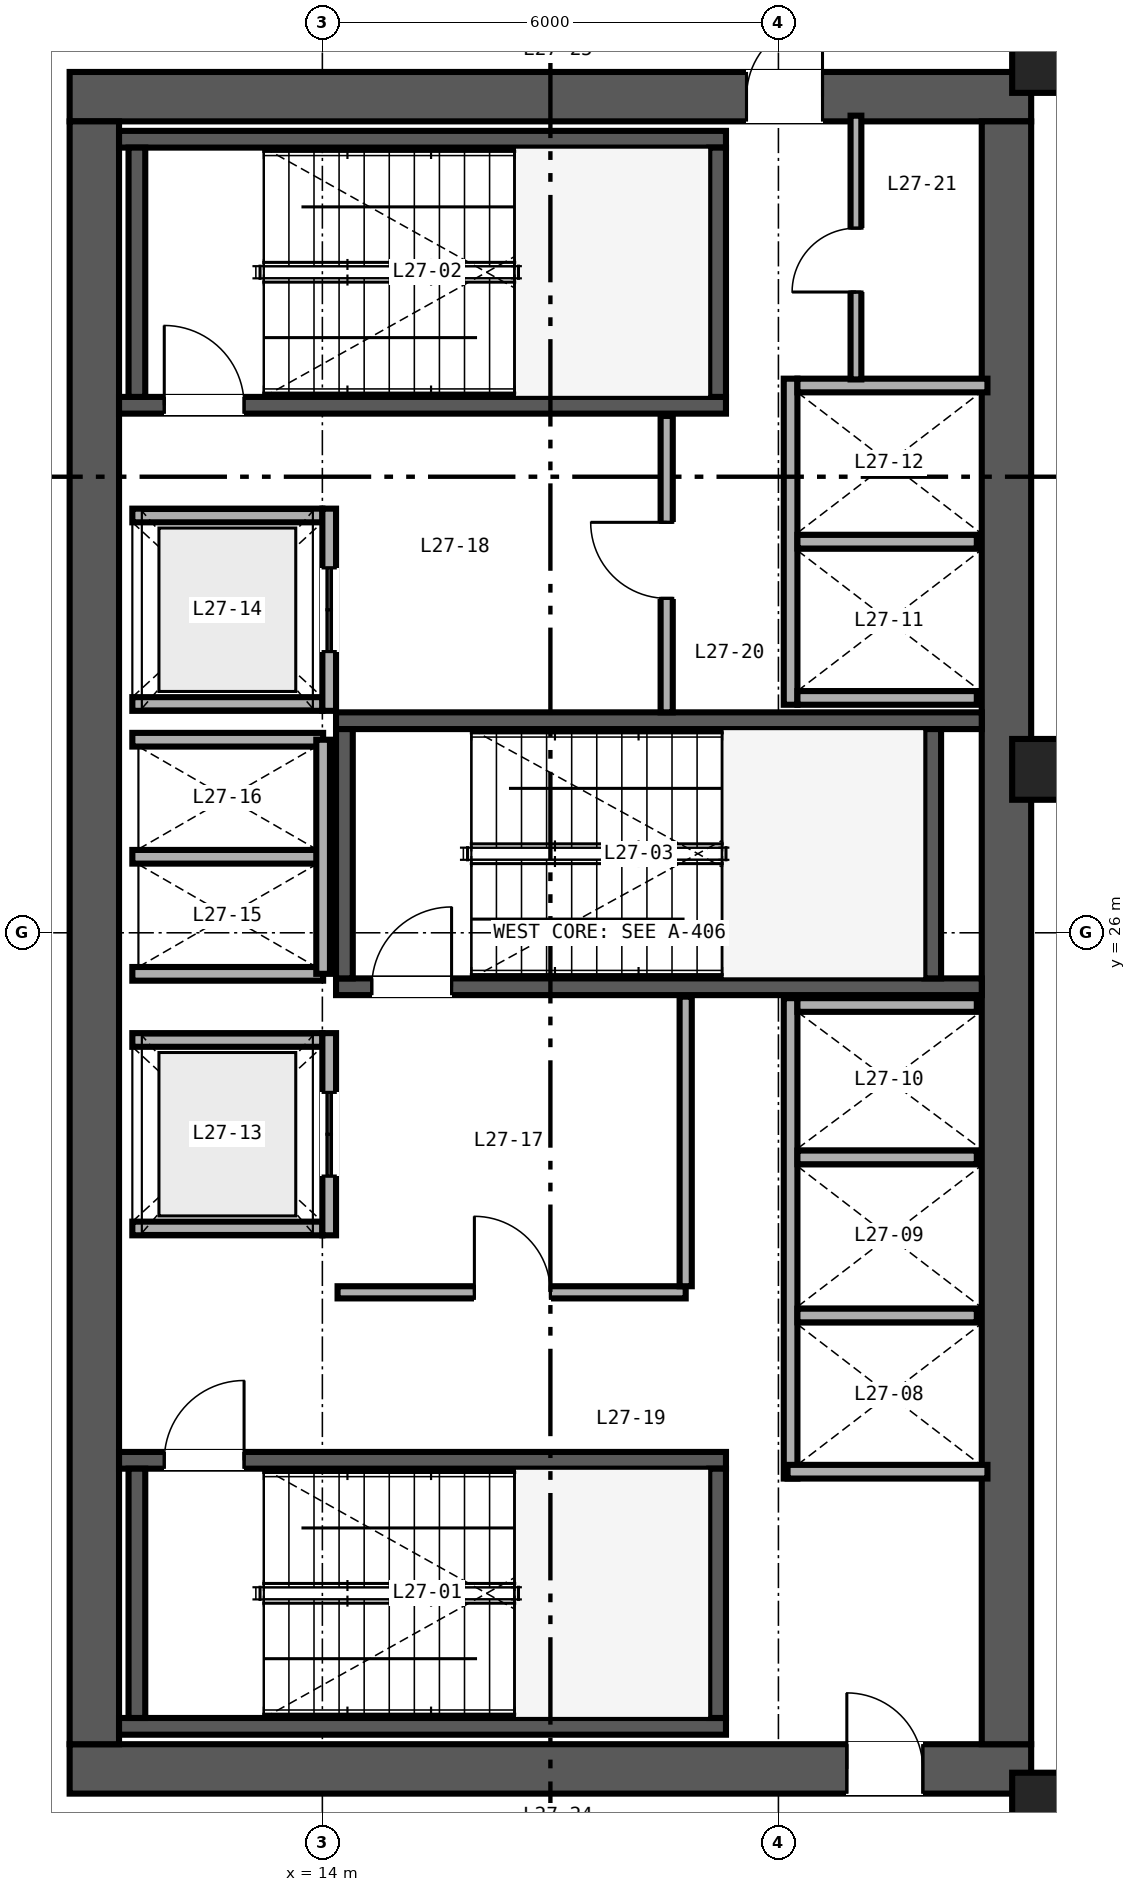
"""IFC4 building model, lengths in metres.
Left out: names, types, materials, properties, quantities, classifications, styles, units other than length and angle.
Written with IfcOpenShell. Run it as: python <this file> out.ifc"""

import sys

from ifc_helpers import new_model, si_unit, direction, frame, frame_2d, origin, origin_2d, place, context, subcontext, project, spatial, rectangle, hollow_rectangle, extrude, source, transform, mapped, element, fill, save


model = new_model("IFC4")
c1 = context("Model", 3, precision=1e-05, world=origin(), true_north=direction((0.0, 1.0)))
c2 = subcontext(c1, "Body", "Model", "MODEL_VIEW")
j1 = project(units=[si_unit("LENGTHUNIT", "METRE"), si_unit("PLANEANGLEUNIT", "RADIAN")], contexts=[c1])
p1 = place(None, origin())
s1 = spatial("IfcSite", under=j1, at=p1, CompositionType="ELEMENT")
p2 = place(p1, origin())
s2 = spatial("IfcBuilding", under=s1, at=p2, CompositionType="ELEMENT")
p3 = place(p2, frame((0.0, 0.0, 111.6)))
s3 = spatial("IfcBuildingStorey", under=s2, at=p3, CompositionType="ELEMENT", Elevation=111.6)
p4 = place(p3, frame((10.675, 15.0, 0.0), z_axis=(0.0, 0.0, 1.0), x_axis=(1.0, 0.0, 0.0)))
e1 = element("IfcWall", 1, at=p4, inside=s3, PredefinedType="SHEAR", context=c2, shape_type="SweptSolid", body=[
    extrude(rectangle(XDim=12.65, YDim=0.65, at=frame_2d((6.325, 0.0))), origin(), (0.0, 0.0, 1.0), 3.36),
])
p5 = place(p4, frame((10.225, 0.0, 0.0)))
e2 = element("IfcOpeningElement", 2, at=p5, cuts=e1, PredefinedType="OPENING", context=c2, shape_type="SweptSolid", body=[
    extrude(rectangle(XDim=1.0, YDim=2.15, at=frame_2d((0.5, 1.075))), frame((0.0, 0.335, 0.0), z_axis=(0.0, -1.0, 0.0), x_axis=(1.0, 0.0, 0.0)), (0.0, 0.0, 1.0), 0.67),
])
p6 = place(p3, frame((10.675, 37.0, 0.0), z_axis=(0.0, 0.0, 1.0), x_axis=(1.0, 0.0, 0.0)))
e3 = element("IfcWall", 3, at=p6, inside=s3, PredefinedType="SHEAR", context=c2, shape_type="SweptSolid", body=[
    extrude(rectangle(XDim=12.65, YDim=0.65, at=frame_2d((6.325, 0.0))), origin(), (0.0, 0.0, 1.0), 3.36),
])
p7 = place(p6, frame((8.905, 0.0, 0.0)))
e4 = element("IfcOpeningElement", 4, at=p7, cuts=e3, PredefinedType="OPENING", context=c2, shape_type="SweptSolid", body=[
    extrude(rectangle(XDim=1.0, YDim=2.15, at=frame_2d((0.5, 1.075))), frame((0.0, 0.335, 0.0), z_axis=(0.0, -1.0, 0.0), x_axis=(1.0, 0.0, 0.0)), (0.0, 0.0, 1.0), 0.67),
])
for number, where, z_axis, x_axis in (
    (5, (11.0, 15.325, 0.0), (0.0, 0.0, 1.0), (0.0, 1.0, 0.0)),
    (6, (23.0, 15.325, 0.0), (0.0, 0.0, 1.0), (0.0, 1.0, 0.0)),
):
    element("IfcWall", number, at=place(p3, frame(where, z_axis=z_axis, x_axis=x_axis)), inside=s3, PredefinedType="SHEAR", context=c2, shape_type="SweptSolid", body=[
        extrude(rectangle(XDim=21.35, YDim=0.65, at=frame_2d((10.675, 0.0))), origin(), (0.0, 0.0, 1.0), 3.36),
    ])
p8 = place(p3, frame((11.325, 15.56, 0.0), z_axis=(0.0, 0.0, 1.0), x_axis=(1.0, 0.0, 0.0)))
e7 = element("IfcWall", 7, at=p8, inside=s3, PredefinedType="SHEAR", context=c2, shape_type="SweptSolid", body=[
    extrude(rectangle(XDim=7.985, YDim=0.22, at=frame_2d((3.993, 0.0))), origin(), (0.0, 0.0, 1.0), 3.4),
])
p9 = place(p3, frame((11.325, 19.06, 0.0), z_axis=(0.0, 0.0, 1.0), x_axis=(1.0, 0.0, 0.0)))
e8 = element("IfcWall", 8, at=p9, inside=s3, PredefinedType="SHEAR", context=c2, shape_type="SweptSolid", body=[
    extrude(rectangle(XDim=7.985, YDim=0.22, at=frame_2d((3.993, 0.0))), origin(), (0.0, 0.0, 1.0), 3.4),
])
p10 = place(p9, frame((0.595, 0.0, 0.0)))
e9 = element("IfcOpeningElement", 9, at=p10, cuts=e8, PredefinedType="OPENING", context=c2, shape_type="SweptSolid", body=[
    extrude(rectangle(XDim=1.05, YDim=2.15, at=frame_2d((0.525, 1.075))), frame((0.0, 0.12, 0.0), z_axis=(0.0, -1.0, 0.0), x_axis=(1.0, 0.0, 0.0)), (0.0, 0.0, 1.0), 0.24),
])
for number, where, z_axis, x_axis in (
    (10, (11.56, 15.67, 0.0), (0.0, 0.0, 1.0), (0.0, 1.0, 0.0)),
    (11, (19.2, 15.67, 0.0), (0.0, 0.0, 1.0), (0.0, 1.0, 0.0)),
):
    element("IfcWall", number, at=place(p3, frame(where, z_axis=z_axis, x_axis=x_axis)), inside=s3, PredefinedType="SHEAR", context=c2, shape_type="SweptSolid", body=[
        extrude(rectangle(XDim=3.28, YDim=0.22, at=frame_2d((1.64, 0.0))), origin(), (0.0, 0.0, 1.0), 3.4),
    ])
p11 = place(p3, frame((11.325, 32.94, 0.0), z_axis=(0.0, 0.0, 1.0), x_axis=(1.0, 0.0, 0.0)))
e12 = element("IfcWall", 12, at=p11, inside=s3, PredefinedType="SHEAR", context=c2, shape_type="SweptSolid", body=[
    extrude(rectangle(XDim=7.985, YDim=0.22, at=frame_2d((3.993, 0.0))), origin(), (0.0, 0.0, 1.0), 3.4),
])
p12 = place(p11, frame((0.595, 0.0, 0.0)))
e13 = element("IfcOpeningElement", 13, at=p12, cuts=e12, PredefinedType="OPENING", context=c2, shape_type="SweptSolid", body=[
    extrude(rectangle(XDim=1.05, YDim=2.15, at=frame_2d((0.525, 1.075))), frame((0.0, 0.12, 0.0), z_axis=(0.0, -1.0, 0.0), x_axis=(1.0, 0.0, 0.0)), (0.0, 0.0, 1.0), 0.24),
])
p13 = place(p3, frame((11.325, 36.44, 0.0), z_axis=(0.0, 0.0, 1.0), x_axis=(1.0, 0.0, 0.0)))
e14 = element("IfcWall", 14, at=p13, inside=s3, PredefinedType="SHEAR", context=c2, shape_type="SweptSolid", body=[
    extrude(rectangle(XDim=7.985, YDim=0.22, at=frame_2d((3.993, 0.0))), origin(), (0.0, 0.0, 1.0), 3.4),
])
for number, where, z_axis, x_axis in (
    (15, (11.56, 33.05, 0.0), (0.0, 0.0, 1.0), (0.0, 1.0, 0.0)),
    (16, (19.2, 33.05, 0.0), (0.0, 0.0, 1.0), (0.0, 1.0, 0.0)),
):
    element("IfcWall", number, at=place(p3, frame(where, z_axis=z_axis, x_axis=x_axis)), inside=s3, PredefinedType="SHEAR", context=c2, shape_type="SweptSolid", body=[
        extrude(rectangle(XDim=3.28, YDim=0.22, at=frame_2d((1.64, 0.0))), origin(), (0.0, 0.0, 1.0), 3.4),
    ])
p14 = place(p3, frame((14.18, 25.29, 0.0), z_axis=(0.0, 0.0, 1.0), x_axis=(1.0, 0.0, 0.0)))
e17 = element("IfcWall", 17, at=p14, inside=s3, PredefinedType="SHEAR", context=c2, shape_type="SweptSolid", body=[
    extrude(rectangle(XDim=8.495, YDim=0.22, at=frame_2d((4.248, 0.0))), origin(), (0.0, 0.0, 1.0), 3.4),
])
p15 = place(p14, frame((0.47, 0.0, 0.0)))
e18 = element("IfcOpeningElement", 18, at=p15, cuts=e17, PredefinedType="OPENING", context=c2, shape_type="SweptSolid", body=[
    extrude(rectangle(XDim=1.05, YDim=2.15, at=frame_2d((0.525, 1.075))), frame((0.0, 0.12, 0.0), z_axis=(0.0, -1.0, 0.0), x_axis=(1.0, 0.0, 0.0)), (0.0, 0.0, 1.0), 0.24),
])
p16 = place(p3, frame((14.18, 28.79, 0.0), z_axis=(0.0, 0.0, 1.0), x_axis=(1.0, 0.0, 0.0)))
e19 = element("IfcWall", 19, at=p16, inside=s3, PredefinedType="SHEAR", context=c2, shape_type="SweptSolid", body=[
    extrude(rectangle(XDim=8.495, YDim=0.22, at=frame_2d((4.248, 0.0))), origin(), (0.0, 0.0, 1.0), 3.4),
])
for number, where, z_axis, x_axis in (
    (20, (14.29, 25.4, 0.0), (0.0, 0.0, 1.0), (0.0, 1.0, 0.0)),
    (21, (22.03, 25.4, 0.0), (0.0, 0.0, 1.0), (0.0, 1.0, 0.0)),
):
    element("IfcWall", number, at=place(p3, frame(where, z_axis=z_axis, x_axis=x_axis)), inside=s3, PredefinedType="SHEAR", context=c2, shape_type="SweptSolid", body=[
        extrude(rectangle(XDim=3.28, YDim=0.22, at=frame_2d((1.64, 0.0))), origin(), (0.0, 0.0, 1.0), 3.4),
    ])
m1 = source(origin(), c2, "Body", "SweptSolid", [
    extrude(hollow_rectangle(XDim=0.85, YDim=0.8, WallThickness=0.032, at=origin_2d()), origin(), (0.0, 0.0, 1.0), 3.36),
])
for number, where, z_axis, x_axis in (
    (22, (23.5, 14.55, 0.0), (0.0, 0.0, 1.0), (1.0, 0.0, 0.0)),
    (23, (23.5, 28.15, 0.0), (0.0, 0.0, 1.0), (1.0, 0.0, 0.0)),
    (24, (23.5, 37.45, 0.0), (0.0, 0.0, 1.0), (1.0, 0.0, 0.0)),
):
    element("IfcColumn", number, at=place(p3, frame(where, z_axis=z_axis, x_axis=x_axis)), inside=s3, PredefinedType="COLUMN", context=c2, shape_type="MappedRepresentation", body=[
        mapped(m1, transform((0.0, 0.0, 0.0), scale=1.0)),
    ])
p17 = place(p3, frame((20.16, 18.82, 0.0), z_axis=(0.0, 0.0, 1.0), x_axis=(0.0, 1.0, 0.0)))
e25 = element("IfcWall", 25, at=p17, inside=s3, PredefinedType="SOLIDWALL", context=c2, shape_type="SweptSolid", body=[
    extrude(rectangle(XDim=6.32, YDim=0.18, at=frame_2d((3.16, 0.0))), origin(), (0.0, 0.0, 1.0), 2.36),
])
p18 = place(p3, frame((20.12, 18.91, 0.0), z_axis=(0.0, 0.0, 1.0), x_axis=(1.0, 0.0, 0.0)))
e26 = element("IfcWall", 26, at=p18, inside=s3, PredefinedType="SOLIDWALL", context=c2, shape_type="SweptSolid", body=[
    extrude(rectangle(XDim=2.63, YDim=0.18, at=frame_2d((1.315, 0.0))), origin(), (0.0, 0.0, 1.0), 3.36),
])
p19 = place(p3, frame((20.25, 25.05, 0.0), z_axis=(0.0, 0.0, 1.0), x_axis=(1.0, 0.0, 0.0)))
e27 = element("IfcWall", 27, at=p19, inside=s3, PredefinedType="SOLIDWALL", context=c2, shape_type="SweptSolid", body=[
    extrude(rectangle(XDim=2.36, YDim=0.18, at=frame_2d((1.18, 0.0))), origin(), (0.0, 0.0, 1.0), 3.36),
])
p20 = place(p3, frame((20.25, 20.965, 0.0), z_axis=(0.0, 0.0, 1.0), x_axis=(1.0, 0.0, 0.0)))
e28 = element("IfcWall", 28, at=p20, inside=s3, PredefinedType="SOLIDWALL", context=c2, shape_type="SweptSolid", body=[
    extrude(rectangle(XDim=2.36, YDim=0.18, at=frame_2d((1.18, 0.0))), origin(), (0.0, 0.0, 1.0), 2.36),
])
p21 = place(p3, frame((20.25, 23.045, 0.0), z_axis=(0.0, 0.0, 1.0), x_axis=(1.0, 0.0, 0.0)))
e29 = element("IfcWall", 29, at=p21, inside=s3, PredefinedType="SOLIDWALL", context=c2, shape_type="SweptSolid", body=[
    extrude(rectangle(XDim=2.36, YDim=0.18, at=frame_2d((1.18, 0.0))), origin(), (0.0, 0.0, 1.0), 3.36),
])
p22 = place(p3, frame((20.16, 29.0, 0.0), z_axis=(0.0, 0.0, 1.0), x_axis=(0.0, 1.0, 0.0)))
e30 = element("IfcWall", 30, at=p22, inside=s3, PredefinedType="SOLIDWALL", context=c2, shape_type="SweptSolid", body=[
    extrude(rectangle(XDim=4.29, YDim=0.18, at=frame_2d((2.145, 0.0))), origin(), (0.0, 0.0, 1.0), 3.36),
])
p23 = place(p3, frame((20.25, 29.09, 0.0), z_axis=(0.0, 0.0, 1.0), x_axis=(1.0, 0.0, 0.0)))
e31 = element("IfcWall", 31, at=p23, inside=s3, PredefinedType="SOLIDWALL", context=c2, shape_type="SweptSolid", body=[
    extrude(rectangle(XDim=2.36, YDim=0.18, at=frame_2d((1.18, 0.0))), origin(), (0.0, 0.0, 1.0), 3.36),
])
p24 = place(p3, frame((20.25, 33.2, 0.0), z_axis=(0.0, 0.0, 1.0), x_axis=(1.0, 0.0, 0.0)))
e32 = element("IfcWall", 32, at=p24, inside=s3, PredefinedType="SOLIDWALL", context=c2, shape_type="SweptSolid", body=[
    extrude(rectangle(XDim=2.5, YDim=0.18, at=frame_2d((1.25, 0.0))), origin(), (0.0, 0.0, 1.0), 3.36),
])
p25 = place(p3, frame((20.25, 31.145, 0.0), z_axis=(0.0, 0.0, 1.0), x_axis=(1.0, 0.0, 0.0)))
e33 = element("IfcWall", 33, at=p25, inside=s3, PredefinedType="SOLIDWALL", context=c2, shape_type="SweptSolid", body=[
    extrude(rectangle(XDim=2.36, YDim=0.18, at=frame_2d((1.18, 0.0))), origin(), (0.0, 0.0, 1.0), 3.36),
])
for number, where, z_axis, x_axis in (
    (34, (11.5, 22.11, 0.0), (0.0, 0.0, 1.0), (1.0, 0.0, 0.0)),
    (35, (11.5, 24.59, 0.0), (0.0, 0.0, 1.0), (1.0, 0.0, 0.0)),
):
    element("IfcWall", number, at=place(p3, frame(where, z_axis=z_axis, x_axis=x_axis)), inside=s3, PredefinedType="SOLIDWALL", context=c2, shape_type="SweptSolid", body=[
        extrude(rectangle(XDim=2.5, YDim=0.18, at=frame_2d((1.25, 0.0))), origin(), (0.0, 0.0, 1.0), 3.36),
    ])
p26 = place(p3, frame((14.09, 22.02, 0.0), z_axis=(0.0, 0.0, 1.0), x_axis=(0.0, 1.0, 0.0)))
e36 = element("IfcWall", 36, at=p26, inside=s3, PredefinedType="SOLIDWALL", context=c2, shape_type="SweptSolid", body=[
    extrude(rectangle(XDim=2.66, YDim=0.18, at=frame_2d((1.33, 0.0))), origin(), (0.0, 0.0, 1.0), 3.36),
])
p27 = place(p26, frame((0.78, 0.0, 0.0)))
e37 = element("IfcOpeningElement", 37, at=p27, cuts=e36, PredefinedType="OPENING", context=c2, shape_type="SweptSolid", body=[
    extrude(rectangle(XDim=1.1, YDim=2.2, at=frame_2d((0.55, 1.1))), frame((0.0, 0.1, 0.0), z_axis=(0.0, -1.0, 0.0), x_axis=(1.0, 0.0, 0.0)), (0.0, 0.0, 1.0), 0.2),
])
for number, where, z_axis, x_axis in (
    (38, (11.5, 29.01, 0.0), (0.0, 0.0, 1.0), (1.0, 0.0, 0.0)),
    (39, (11.5, 31.49, 0.0), (0.0, 0.0, 1.0), (1.0, 0.0, 0.0)),
):
    element("IfcWall", number, at=place(p3, frame(where, z_axis=z_axis, x_axis=x_axis)), inside=s3, PredefinedType="SOLIDWALL", context=c2, shape_type="SweptSolid", body=[
        extrude(rectangle(XDim=2.5, YDim=0.18, at=frame_2d((1.25, 0.0))), origin(), (0.0, 0.0, 1.0), 3.36),
    ])
p28 = place(p3, frame((14.09, 28.92, 0.0), z_axis=(0.0, 0.0, 1.0), x_axis=(0.0, 1.0, 0.0)))
e40 = element("IfcWall", 40, at=p28, inside=s3, PredefinedType="SOLIDWALL", context=c2, shape_type="SweptSolid", body=[
    extrude(rectangle(XDim=2.66, YDim=0.18, at=frame_2d((1.33, 0.0))), origin(), (0.0, 0.0, 1.0), 3.36),
])
p29 = place(p28, frame((0.78, 0.0, 0.0)))
e41 = element("IfcOpeningElement", 41, at=p29, cuts=e40, PredefinedType="OPENING", context=c2, shape_type="SweptSolid", body=[
    extrude(rectangle(XDim=1.1, YDim=2.2, at=frame_2d((0.55, 1.1))), frame((0.0, 0.1, 0.0), z_axis=(0.0, -1.0, 0.0), x_axis=(1.0, 0.0, 0.0)), (0.0, 0.0, 1.0), 0.2),
])
for number, where, z_axis, x_axis in (
    (42, (11.5, 25.46, 0.0), (0.0, 0.0, 1.0), (1.0, 0.0, 0.0)),
    (43, (11.5, 27.0, 0.0), (0.0, 0.0, 1.0), (1.0, 0.0, 0.0)),
    (44, (11.5, 28.54, 0.0), (0.0, 0.0, 1.0), (1.0, 0.0, 0.0)),
):
    element("IfcWall", number, at=place(p3, frame(where, z_axis=z_axis, x_axis=x_axis)), inside=s3, PredefinedType="SOLIDWALL", context=c2, shape_type="SweptSolid", body=[
        extrude(rectangle(XDim=2.51, YDim=0.18, at=frame_2d((1.255, 0.0))), origin(), (0.0, 0.0, 1.0), 3.36),
    ])
p30 = place(p3, frame((14.01, 25.46, 0.0), z_axis=(0.0, 0.0, 1.0), x_axis=(0.0, 1.0, 0.0)))
e45 = element("IfcWall", 45, at=p30, inside=s3, PredefinedType="SOLIDWALL", context=c2, shape_type="SweptSolid", body=[
    extrude(rectangle(XDim=3.08, YDim=0.18, at=frame_2d((1.54, 0.0))), origin(), (0.0, 0.0, 1.0), 3.36),
])
p31 = place(p3, frame((14.2, 21.27, 0.0), z_axis=(0.0, 0.0, 1.0), x_axis=(1.0, 0.0, 0.0)))
e46 = element("IfcWall", 46, at=p31, inside=s3, PredefinedType="PARTITIONING", context=c2, shape_type="SweptSolid", body=[
    extrude(rectangle(XDim=4.58, YDim=0.16, at=frame_2d((2.29, 0.0))), origin(), (0.0, 0.0, 1.0), 3.36),
])
p32 = place(p31, frame((1.8, 0.0, 0.0)))
e47 = element("IfcOpeningElement", 47, at=p32, cuts=e46, PredefinedType="OPENING", context=c2, shape_type="SweptSolid", body=[
    extrude(rectangle(XDim=1.0, YDim=2.15, at=frame_2d((0.5, 1.075))), frame((0.0, 0.09, 0.0), z_axis=(0.0, -1.0, 0.0), x_axis=(1.0, 0.0, 0.0)), (0.0, 0.0, 1.0), 0.18),
])
p33 = place(p3, frame((18.78, 21.35, 0.0), z_axis=(0.0, 0.0, 1.0), x_axis=(0.0, 1.0, 0.0)))
e48 = element("IfcWall", 48, at=p33, inside=s3, PredefinedType="PARTITIONING", context=c2, shape_type="SweptSolid", body=[
    extrude(rectangle(XDim=3.81, YDim=0.16, at=frame_2d((1.905, 0.0))), origin(), (0.0, 0.0, 1.0), 3.36),
])
p34 = place(p3, frame((18.53, 28.9, 0.0), z_axis=(0.0, 0.0, 1.0), x_axis=(0.0, 1.0, 0.0)))
e49 = element("IfcWall", 49, at=p34, inside=s3, PredefinedType="PARTITIONING", context=c2, shape_type="SweptSolid", body=[
    extrude(rectangle(XDim=3.9, YDim=0.16, at=frame_2d((1.95, 0.0))), origin(), (0.0, 0.0, 1.0), 3.36),
])
p35 = place(p34, frame((1.5, 0.0, 0.0)))
e50 = element("IfcOpeningElement", 50, at=p35, cuts=e49, PredefinedType="OPENING", context=c2, shape_type="SweptSolid", body=[
    extrude(rectangle(XDim=1.0, YDim=2.15, at=frame_2d((0.5, 1.075))), frame((0.0, 0.09, 0.0), z_axis=(0.0, -1.0, 0.0), x_axis=(1.0, 0.0, 0.0)), (0.0, 0.0, 1.0), 0.18),
])
p36 = place(p3, frame((21.02, 33.28, 0.0), z_axis=(0.0, 0.0, 1.0), x_axis=(0.0, 1.0, 0.0)))
e51 = element("IfcWall", 51, at=p36, inside=s3, PredefinedType="PARTITIONING", context=c2, shape_type="SweptSolid", body=[
    extrude(rectangle(XDim=3.47, YDim=0.142, at=frame_2d((1.735, 0.0))), origin(), (0.0, 0.0, 1.0), 3.36),
])
p37 = place(p36, frame((1.15, 0.0, 0.0)))
e52 = element("IfcOpeningElement", 52, at=p37, cuts=e51, PredefinedType="OPENING", context=c2, shape_type="SweptSolid", body=[
    extrude(rectangle(XDim=0.84, YDim=2.1, at=frame_2d((0.42, 1.05))), frame((0.0, 0.081, 0.0), z_axis=(0.0, -1.0, 0.0), x_axis=(1.0, 0.0, 0.0)), (0.0, 0.0, 1.0), 0.162),
])
m2 = source(origin(), c2, "Body", "SweptSolid", [
    extrude(rectangle(XDim=1.05, YDim=2.15, at=frame_2d((0.525, 1.075))), frame((0.0, 0.025, 0.0), z_axis=(0.0, -1.0, 0.0), x_axis=(1.0, 0.0, 0.0)), (0.0, 0.0, 1.0), 0.05),
])
p38 = place(p10, origin())
e53 = element("IfcDoor", 53, at=p38, inside=s3, OperationType="SINGLE_SWING_RIGHT", PredefinedType="DOOR", context=c2, shape_type="MappedRepresentation", body=[
    mapped(m2, transform((0.0, 0.0, 0.0), scale=1.0)),
])
fill(e9, e53)
p39 = place(p12, origin())
e54 = element("IfcDoor", 54, at=p39, inside=s3, OperationType="SINGLE_SWING_LEFT", PredefinedType="DOOR", context=c2, shape_type="MappedRepresentation", body=[
    mapped(m2, transform((0.0, 0.0, 0.0), scale=1.0)),
])
fill(e13, e54)
p40 = place(p15, origin())
e55 = element("IfcDoor", 55, at=p40, inside=s3, OperationType="SINGLE_SWING_RIGHT", PredefinedType="DOOR", context=c2, shape_type="MappedRepresentation", body=[
    mapped(m2, transform((0.0, 0.0, 0.0), scale=1.0)),
])
fill(e18, e55)
m3 = source(origin(), c2, "Body", "SweptSolid", [
    extrude(rectangle(XDim=1.1, YDim=2.2, at=frame_2d((0.55, 1.1))), frame((0.0, 0.025, 0.0), z_axis=(0.0, -1.0, 0.0), x_axis=(1.0, 0.0, 0.0)), (0.0, 0.0, 1.0), 0.05),
])
p41 = place(p27, origin())
e56 = element("IfcDoor", 56, at=p41, inside=s3, OperationType="DOUBLE_DOOR_SLIDING", PredefinedType="DOOR", context=c2, shape_type="MappedRepresentation", body=[
    mapped(m3, transform((0.0, 0.0, 0.0), scale=1.0)),
])
fill(e37, e56)
p42 = place(p29, origin())
e57 = element("IfcDoor", 57, at=p42, inside=s3, OperationType="DOUBLE_DOOR_SLIDING", PredefinedType="DOOR", context=c2, shape_type="MappedRepresentation", body=[
    mapped(m3, transform((0.0, 0.0, 0.0), scale=1.0)),
])
fill(e41, e57)
m4 = source(origin(), c2, "Body", "SweptSolid", [
    extrude(rectangle(XDim=1.0, YDim=2.15, at=frame_2d((0.5, 1.075))), frame((0.0, 0.025, 0.0), z_axis=(0.0, -1.0, 0.0), x_axis=(1.0, 0.0, 0.0)), (0.0, 0.0, 1.0), 0.05),
])
p43 = place(p32, origin())
e58 = element("IfcDoor", 58, at=p43, inside=s3, OperationType="SINGLE_SWING_LEFT", PredefinedType="DOOR", context=c2, shape_type="MappedRepresentation", body=[
    mapped(m4, transform((0.0, 0.0, 0.0), scale=1.0)),
])
fill(e47, e58)
p44 = place(p35, origin())
e59 = element("IfcDoor", 59, at=p44, inside=s3, OperationType="SINGLE_SWING_RIGHT", PredefinedType="DOOR", context=c2, shape_type="MappedRepresentation", body=[
    mapped(m4, transform((0.0, 0.0, 0.0), scale=1.0)),
])
fill(e50, e59)
m5 = source(origin(), c2, "Body", "SweptSolid", [
    extrude(rectangle(XDim=0.84, YDim=2.1, at=frame_2d((0.42, 1.05))), frame((0.0, 0.025, 0.0), z_axis=(0.0, -1.0, 0.0), x_axis=(1.0, 0.0, 0.0)), (0.0, 0.0, 1.0), 0.05),
])
p45 = place(p37, origin())
e60 = element("IfcDoor", 60, at=p45, inside=s3, OperationType="SINGLE_SWING_LEFT", PredefinedType="DOOR", context=c2, shape_type="MappedRepresentation", body=[
    mapped(m5, transform((0.0, 0.0, 0.0), scale=1.0)),
])
fill(e52, e60)
p46 = place(p5, origin())
e61 = element("IfcDoor", 61, at=p46, inside=s3, OperationType="SINGLE_SWING_LEFT", PredefinedType="DOOR", context=c2, shape_type="MappedRepresentation", body=[
    mapped(m4, transform((0.0, 0.0, 0.0), scale=1.0)),
])
fill(e2, e61)
p47 = place(p7, origin())
e62 = element("IfcDoor", 62, at=p47, inside=s3, OperationType="SINGLE_SWING_RIGHT", PredefinedType="DOOR", context=c2, shape_type="MappedRepresentation", body=[
    mapped(m4, transform((0.0, 0.0, 0.0), scale=1.0)),
])
fill(e4, e62)
save(model, sys.argv[1])
